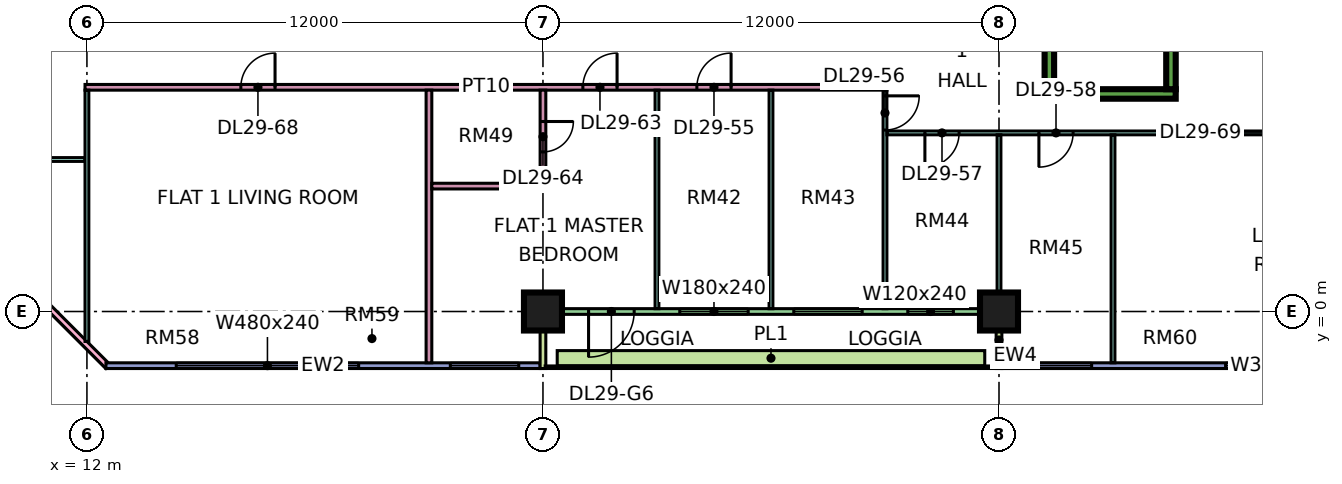
"""IFC4 building model, lengths in metres.
Left out: names, types, materials, properties, quantities, classifications, styles, units other than length and angle.
Written with IfcOpenShell. Run it as: python <this file> out.ifc"""

import sys

from ifc_helpers import new_model, si_unit, direction, frame, frame_2d, origin, origin_2d, place, context, subcontext, project, spatial, rectangle, extrude, element, fill, save


model = new_model("IFC4")
c1 = context("Model", 3, precision=1e-05, world=origin(), true_north=direction((0.0, 1.0)))
c2 = subcontext(c1, "Body", "Model", "MODEL_VIEW")
j1 = project(units=[si_unit("LENGTHUNIT", "METRE"), si_unit("PLANEANGLEUNIT", "RADIAN")], contexts=[c1])
p1 = place(None, origin())
s1 = spatial("IfcSite", under=j1, at=p1, CompositionType="ELEMENT")
p2 = place(p1, origin())
s2 = spatial("IfcBuilding", under=s1, at=p2, CompositionType="ELEMENT")
p3 = place(p2, frame((0.0, 0.0, 125.65)))
s3 = spatial("IfcBuildingStorey", under=s2, at=p3, CompositionType="ELEMENT", Elevation=125.65)
for number, where, z_axis, x_axis in (
    (1, (24.0, 0.0, 0.0), (0.0, 0.0, 1.0), (1.0, 0.0, 0.0)),
    (2, (36.0, 0.0, 0.0), (0.0, 0.0, 1.0), (1.0, 0.0, 0.0)),
):
    element("IfcColumn", number, at=place(p3, frame(where, z_axis=z_axis, x_axis=x_axis)), inside=s3, PredefinedType="COLUMN", context=c2, shape_type="SweptSolid", body=[
        extrude(rectangle(XDim=1.0, YDim=1.0, at=origin_2d()), origin(), (0.0, 0.0, 1.0), 3.75),
    ])
p4 = place(p3, frame((37.2, 5.725, 0.0), z_axis=(0.0, 0.0, 1.0), x_axis=(1.0, 0.0, 0.0)))
e3 = element("IfcWall", 3, at=p4, inside=s3, PredefinedType="SHEAR", context=c2, shape_type="SweptSolid", body=[
    extrude(rectangle(XDim=3.45, YDim=0.25, at=frame_2d((1.725, 0.0))), origin(), (0.0, 0.0, 1.0), 3.75),
])
for number, where, z_axis, x_axis in (
    (4, (37.325, 5.85, 0.0), (0.0, 0.0, 1.0), (0.0, 1.0, 0.0)),
    (5, (40.525, 5.85, 0.0), (0.0, 0.0, 1.0), (0.0, 1.0, 0.0)),
):
    element("IfcWall", number, at=place(p3, frame(where, z_axis=z_axis, x_axis=x_axis)), inside=s3, PredefinedType="SHEAR", context=c2, shape_type="SweptSolid", body=[
        extrude(rectangle(XDim=6.5, YDim=0.25, at=frame_2d((3.25, 0.0))), origin(), (0.0, 0.0, 1.0), 3.75),
    ])
p5 = place(p3, frame((-1.447, 12.553, 0.0), z_axis=(0.0, 0.0, 1.0), x_axis=(0.707106781187, -0.707106781187, 0.0)))
e6 = element("IfcWall", 6, at=p5, inside=s3, PredefinedType="SOLIDWALL", context=c2, shape_type="SweptSolid", body=[
    extrude(rectangle(XDim=19.799, YDim=0.15, at=frame_2d((9.899, 0.0))), origin(), (0.0, 0.0, 1.0), 3.35),
])
p6 = place(p5, frame((2.212, 0.0, 0.45)))
e7 = element("IfcOpeningElement", 7, at=p6, cuts=e6, PredefinedType="OPENING", context=c2, shape_type="SweptSolid", body=[
    extrude(rectangle(XDim=3.0, YDim=2.4, at=frame_2d((1.5, 1.2))), frame((0.0, 0.085, 0.0), z_axis=(0.0, -1.0, 0.0), x_axis=(1.0, 0.0, 0.0)), (0.0, 0.0, 1.0), 0.17),
])
p7 = place(p5, frame((10.216, 0.0, 0.45)))
e8 = element("IfcOpeningElement", 8, at=p7, cuts=e6, PredefinedType="OPENING", context=c2, shape_type="SweptSolid", body=[
    extrude(rectangle(XDim=3.0, YDim=2.4, at=frame_2d((1.5, 1.2))), frame((0.0, 0.085, 0.0), z_axis=(0.0, -1.0, 0.0), x_axis=(1.0, 0.0, 0.0)), (0.0, 0.0, 1.0), 0.17),
])
p8 = place(p3, frame((12.5, -1.425, 0.0), z_axis=(0.0, 0.0, 1.0), x_axis=(1.0, 0.0, 0.0)))
e9 = element("IfcWall", 9, at=p8, inside=s3, PredefinedType="SOLIDWALL", context=c2, shape_type="SweptSolid", body=[
    extrude(rectangle(XDim=11.425, YDim=0.15, at=frame_2d((5.712, 0.0))), origin(), (0.0, 0.0, 1.0), 3.35),
])
p9 = place(p8, frame((1.85, 0.0, 0.45)))
e10 = element("IfcOpeningElement", 10, at=p9, cuts=e9, PredefinedType="OPENING", context=c2, shape_type="SweptSolid", body=[
    extrude(rectangle(XDim=4.8, YDim=2.4, at=frame_2d((2.4, 1.2))), frame((0.0, 0.085, 0.0), z_axis=(0.0, -1.0, 0.0), x_axis=(1.0, 0.0, 0.0)), (0.0, 0.0, 1.0), 0.17),
])
p10 = place(p8, frame((9.062, 0.0, 0.45)))
e11 = element("IfcOpeningElement", 11, at=p10, cuts=e9, PredefinedType="OPENING", context=c2, shape_type="SweptSolid", body=[
    extrude(rectangle(XDim=1.8, YDim=2.4, at=frame_2d((0.9, 1.2))), frame((0.0, 0.085, 0.0), z_axis=(0.0, -1.0, 0.0), x_axis=(1.0, 0.0, 0.0)), (0.0, 0.0, 1.0), 0.17),
])
p11 = place(p3, frame((24.075, 0.0, 0.0), z_axis=(0.0, 0.0, 1.0), x_axis=(1.0, 0.0, 0.0)))
e12 = element("IfcWall", 12, at=p11, inside=s3, PredefinedType="SOLIDWALL", context=c2, shape_type="SweptSolid", body=[
    extrude(rectangle(XDim=11.85, YDim=0.15, at=frame_2d((5.925, 0.0))), origin(), (0.0, 0.0, 1.0), 3.35),
])
p12 = place(p11, frame((1.125, 0.0, 0.0)))
e13 = element("IfcOpeningElement", 13, at=p12, cuts=e12, PredefinedType="OPENING", context=c2, shape_type="SweptSolid", body=[
    extrude(rectangle(XDim=1.2, YDim=2.4, at=frame_2d((0.6, 1.2))), frame((0.0, 0.085, 0.0), z_axis=(0.0, -1.0, 0.0), x_axis=(1.0, 0.0, 0.0)), (0.0, 0.0, 1.0), 0.17),
])
p13 = place(p11, frame((3.525, 0.0, 0.45)))
e14 = element("IfcOpeningElement", 14, at=p13, cuts=e12, PredefinedType="OPENING", context=c2, shape_type="SweptSolid", body=[
    extrude(rectangle(XDim=1.8, YDim=2.4, at=frame_2d((0.9, 1.2))), frame((0.0, 0.085, 0.0), z_axis=(0.0, -1.0, 0.0), x_axis=(1.0, 0.0, 0.0)), (0.0, 0.0, 1.0), 0.17),
])
p14 = place(p11, frame((6.525, 0.0, 0.45)))
e15 = element("IfcOpeningElement", 15, at=p14, cuts=e12, PredefinedType="OPENING", context=c2, shape_type="SweptSolid", body=[
    extrude(rectangle(XDim=1.8, YDim=2.4, at=frame_2d((0.9, 1.2))), frame((0.0, 0.085, 0.0), z_axis=(0.0, -1.0, 0.0), x_axis=(1.0, 0.0, 0.0)), (0.0, 0.0, 1.0), 0.17),
])
p15 = place(p11, frame((9.525, 0.0, 0.45)))
e16 = element("IfcOpeningElement", 16, at=p15, cuts=e12, PredefinedType="OPENING", context=c2, shape_type="SweptSolid", body=[
    extrude(rectangle(XDim=1.2, YDim=2.4, at=frame_2d((0.6, 1.2))), frame((0.0, 0.085, 0.0), z_axis=(0.0, -1.0, 0.0), x_axis=(1.0, 0.0, 0.0)), (0.0, 0.0, 1.0), 0.17),
])
for number, where, z_axis, x_axis in (
    (17, (24.0, -1.5, 0.0), (0.0, 0.0, 1.0), (0.0, 1.0, 0.0)),
    (18, (36.0, -1.5, 0.0), (0.0, 0.0, 1.0), (0.0, 1.0, 0.0)),
):
    element("IfcWall", number, at=place(p3, frame(where, z_axis=z_axis, x_axis=x_axis)), inside=s3, PredefinedType="SOLIDWALL", context=c2, shape_type="SweptSolid", body=[
        extrude(rectangle(XDim=1.5, YDim=0.15, at=frame_2d((0.75, 0.0))), origin(), (0.0, 0.0, 1.0), 3.35),
    ])
p16 = place(p3, frame((36.075, -1.425, 0.0), z_axis=(0.0, 0.0, 1.0), x_axis=(1.0, 0.0, 0.0)))
e19 = element("IfcWall", 19, at=p16, inside=s3, PredefinedType="SOLIDWALL", context=c2, shape_type="SweptSolid", body=[
    extrude(rectangle(XDim=11.85, YDim=0.15, at=frame_2d((5.925, 0.0))), origin(), (0.0, 0.0, 1.0), 3.35),
])
p17 = place(p16, frame((0.562, 0.0, 0.45)))
e20 = element("IfcOpeningElement", 20, at=p17, cuts=e19, PredefinedType="OPENING", context=c2, shape_type="SweptSolid", body=[
    extrude(rectangle(XDim=1.8, YDim=2.4, at=frame_2d((0.9, 1.2))), frame((0.0, 0.085, 0.0), z_axis=(0.0, -1.0, 0.0), x_axis=(1.0, 0.0, 0.0)), (0.0, 0.0, 1.0), 0.17),
])
p18 = place(p16, frame((5.887, 0.0, 0.45)))
e21 = element("IfcOpeningElement", 21, at=p18, cuts=e19, PredefinedType="OPENING", context=c2, shape_type="SweptSolid", body=[
    extrude(rectangle(XDim=3.0, YDim=2.4, at=frame_2d((1.5, 1.2))), frame((0.0, 0.085, 0.0), z_axis=(0.0, -1.0, 0.0), x_axis=(1.0, 0.0, 0.0)), (0.0, 0.0, 1.0), 0.17),
])
p19 = place(p3, frame((24.375, -1.229, 0.0), z_axis=(0.0, 0.0, 1.0), x_axis=(1.0, 0.0, 0.0)))
e22 = element("IfcWall", 22, at=p19, inside=s3, PredefinedType="SOLIDWALL", context=c2, shape_type="SweptSolid", body=[
    extrude(rectangle(XDim=11.25, YDim=0.4, at=frame_2d((5.625, 0.0))), origin(), (0.0, 0.0, 1.0), 0.7),
])
p20 = place(p3, frame((9.05, 4.0, 0.0), z_axis=(0.0, 0.0, 1.0), x_axis=(1.0, 0.0, 0.0)))
e23 = element("IfcWall", 23, at=p20, inside=s3, PredefinedType="PARTITIONING", context=c2, shape_type="SweptSolid", body=[
    extrude(rectangle(XDim=2.9, YDim=0.1, at=frame_2d((1.45, 0.0))), origin(), (0.0, 0.0, 1.0), 3.35),
])
p21 = place(p3, frame((11.95, 5.9, 0.0), z_axis=(0.0, 0.0, 1.0), x_axis=(1.0, 0.0, 0.0)))
e24 = element("IfcWall", 24, at=p21, inside=s3, PredefinedType="PARTITIONING", context=c2, shape_type="SweptSolid", body=[
    extrude(rectangle(XDim=21.1, YDim=0.15, at=frame_2d((10.55, 0.0))), origin(), (0.0, 0.0, 1.0), 3.35),
])
p22 = place(p21, frame((16.1, 0.0, 0.0)))
e25 = element("IfcOpeningElement", 25, at=p22, cuts=e24, PredefinedType="OPENING", context=c2, shape_type="SweptSolid", body=[
    extrude(rectangle(XDim=0.9, YDim=2.1, at=frame_2d((0.45, 1.05))), frame((0.0, 0.085, 0.0), z_axis=(0.0, -1.0, 0.0), x_axis=(1.0, 0.0, 0.0)), (0.0, 0.0, 1.0), 0.17),
])
p23 = place(p21, frame((13.1, 0.0, 0.0)))
e26 = element("IfcOpeningElement", 26, at=p23, cuts=e24, PredefinedType="OPENING", context=c2, shape_type="SweptSolid", body=[
    extrude(rectangle(XDim=0.9, YDim=2.1, at=frame_2d((0.45, 1.05))), frame((0.0, 0.085, 0.0), z_axis=(0.0, -1.0, 0.0), x_axis=(1.0, 0.0, 0.0)), (0.0, 0.0, 1.0), 0.17),
])
p24 = place(p21, frame((4.1, 0.0, 0.0)))
e27 = element("IfcOpeningElement", 27, at=p24, cuts=e24, PredefinedType="OPENING", context=c2, shape_type="SweptSolid", body=[
    extrude(rectangle(XDim=0.9, YDim=2.1, at=frame_2d((0.45, 1.05))), frame((0.0, 0.085, 0.0), z_axis=(0.0, -1.0, 0.0), x_axis=(1.0, 0.0, 0.0)), (0.0, 0.0, 1.0), 0.17),
])
p25 = place(p3, frame((12.0, -0.788, 0.0), z_axis=(0.0, 0.0, 1.0), x_axis=(0.0, 1.0, 0.0)))
e28 = element("IfcWall", 28, at=p25, inside=s3, PredefinedType="PARTITIONING", context=c2, shape_type="SweptSolid", body=[
    extrude(rectangle(XDim=6.613, YDim=0.1, at=frame_2d((3.306, 0.0))), origin(), (0.0, 0.0, 1.0), 3.35),
])
p26 = place(p3, frame((21.0, -1.35, 0.0), z_axis=(0.0, 0.0, 1.0), x_axis=(0.0, 1.0, 0.0)))
e29 = element("IfcWall", 29, at=p26, inside=s3, PredefinedType="PARTITIONING", context=c2, shape_type="SweptSolid", body=[
    extrude(rectangle(XDim=7.175, YDim=0.15, at=frame_2d((3.587, 0.0))), origin(), (0.0, 0.0, 1.0), 3.35),
])
p27 = place(p3, frame((21.075, 3.3, 0.0), z_axis=(0.0, 0.0, 1.0), x_axis=(1.0, 0.0, 0.0)))
e30 = element("IfcWall", 30, at=p27, inside=s3, PredefinedType="PARTITIONING", context=c2, shape_type="SweptSolid", body=[
    extrude(rectangle(XDim=3.0, YDim=0.15, at=frame_2d((1.5, 0.0))), origin(), (0.0, 0.0, 1.0), 3.35),
])
p28 = place(p3, frame((24.0, 3.375, 0.0), z_axis=(0.0, 0.0, 1.0), x_axis=(0.0, 1.0, 0.0)))
e31 = element("IfcWall", 31, at=p28, inside=s3, PredefinedType="PARTITIONING", context=c2, shape_type="SweptSolid", body=[
    extrude(rectangle(XDim=2.45, YDim=0.15, at=frame_2d((1.225, 0.0))), origin(), (0.0, 0.0, 1.0), 3.35),
])
p29 = place(p28, frame((0.825, 0.0, 0.0)))
e32 = element("IfcOpeningElement", 32, at=p29, cuts=e31, PredefinedType="OPENING", context=c2, shape_type="SweptSolid", body=[
    extrude(rectangle(XDim=0.8, YDim=2.1, at=frame_2d((0.4, 1.05))), frame((0.0, 0.085, 0.0), z_axis=(0.0, -1.0, 0.0), x_axis=(1.0, 0.0, 0.0)), (0.0, 0.0, 1.0), 0.17),
])
for number, where, z_axis, x_axis in (
    (33, (27.0, 0.074, 0.0), (0.0, 0.0, 1.0), (0.0, 1.0, 0.0)),
    (34, (30.0, 0.074, 0.0), (0.0, 0.0, 1.0), (0.0, 1.0, 0.0)),
):
    element("IfcWall", number, at=place(p3, frame(where, z_axis=z_axis, x_axis=x_axis)), inside=s3, PredefinedType="PARTITIONING", context=c2, shape_type="SweptSolid", body=[
        extrude(rectangle(XDim=5.751, YDim=0.1, at=frame_2d((2.875, 0.0))), origin(), (0.0, 0.0, 1.0), 3.35),
    ])
p30 = place(p3, frame((33.0, 0.074, 0.0), z_axis=(0.0, 0.0, 1.0), x_axis=(0.0, 1.0, 0.0)))
e35 = element("IfcWall", 35, at=p30, inside=s3, PredefinedType="PARTITIONING", context=c2, shape_type="SweptSolid", body=[
    extrude(rectangle(XDim=5.751, YDim=0.1, at=frame_2d((2.875, 0.0))), origin(), (0.0, 0.0, 1.0), 3.35),
])
p31 = place(p30, frame((4.701, 0.0, 0.0)))
e36 = element("IfcOpeningElement", 36, at=p31, cuts=e35, PredefinedType="OPENING", context=c2, shape_type="SweptSolid", body=[
    extrude(rectangle(XDim=0.9, YDim=2.1, at=frame_2d((0.45, 1.05))), frame((0.0, 0.06, 0.0), z_axis=(0.0, -1.0, 0.0), x_axis=(1.0, 0.0, 0.0)), (0.0, 0.0, 1.0), 0.12),
])
p32 = place(p3, frame((33.05, 4.7, 0.0), z_axis=(0.0, 0.0, 1.0), x_axis=(1.0, 0.0, 0.0)))
e37 = element("IfcWall", 37, at=p32, inside=s3, PredefinedType="PARTITIONING", context=c2, shape_type="SweptSolid", body=[
    extrude(rectangle(XDim=20.85, YDim=0.1, at=frame_2d((10.425, 0.0))), origin(), (0.0, 0.0, 1.0), 3.35),
])
p33 = place(p32, frame((1.0, 0.0, 0.0)))
e38 = element("IfcOpeningElement", 38, at=p33, cuts=e37, PredefinedType="OPENING", context=c2, shape_type="SweptSolid", body=[
    extrude(rectangle(XDim=0.9, YDim=2.1, at=frame_2d((0.45, 1.05))), frame((0.0, 0.06, 0.0), z_axis=(0.0, -1.0, 0.0), x_axis=(1.0, 0.0, 0.0)), (0.0, 0.0, 1.0), 0.12),
])
p34 = place(p32, frame((4.0, 0.0, 0.0)))
e39 = element("IfcOpeningElement", 39, at=p34, cuts=e37, PredefinedType="OPENING", context=c2, shape_type="SweptSolid", body=[
    extrude(rectangle(XDim=0.9, YDim=2.1, at=frame_2d((0.45, 1.05))), frame((0.0, 0.06, 0.0), z_axis=(0.0, -1.0, 0.0), x_axis=(1.0, 0.0, 0.0)), (0.0, 0.0, 1.0), 0.12),
])
p35 = place(p32, frame((16.0, 0.0, 0.0)))
e40 = element("IfcOpeningElement", 40, at=p35, cuts=e37, PredefinedType="OPENING", context=c2, shape_type="SweptSolid", body=[
    extrude(rectangle(XDim=0.9, YDim=2.1, at=frame_2d((0.45, 1.05))), frame((0.0, 0.06, 0.0), z_axis=(0.0, -1.0, 0.0), x_axis=(1.0, 0.0, 0.0)), (0.0, 0.0, 1.0), 0.12),
])
p36 = place(p32, frame((19.0, 0.0, 0.0)))
e41 = element("IfcOpeningElement", 41, at=p36, cuts=e37, PredefinedType="OPENING", context=c2, shape_type="SweptSolid", body=[
    extrude(rectangle(XDim=0.9, YDim=2.1, at=frame_2d((0.45, 1.05))), frame((0.0, 0.06, 0.0), z_axis=(0.0, -1.0, 0.0), x_axis=(1.0, 0.0, 0.0)), (0.0, 0.0, 1.0), 0.12),
])
p37 = place(p32, frame((10.0, 0.0, 0.0)))
e42 = element("IfcOpeningElement", 42, at=p37, cuts=e37, PredefinedType="OPENING", context=c2, shape_type="SweptSolid", body=[
    extrude(rectangle(XDim=0.9, YDim=2.1, at=frame_2d((0.45, 1.05))), frame((0.0, 0.06, 0.0), z_axis=(0.0, -1.0, 0.0), x_axis=(1.0, 0.0, 0.0)), (0.0, 0.0, 1.0), 0.12),
])
p38 = place(p3, frame((36.0, 0.0, 0.0), z_axis=(0.0, 0.0, 1.0), x_axis=(0.0, 1.0, 0.0)))
e43 = element("IfcWall", 43, at=p38, inside=s3, PredefinedType="PARTITIONING", context=c2, shape_type="SweptSolid", body=[
    extrude(rectangle(XDim=4.65, YDim=0.1, at=frame_2d((2.325, 0.0))), origin(), (0.0, 0.0, 1.0), 3.35),
])
p39 = place(p3, frame((39.0, -1.35, 0.0), z_axis=(0.0, 0.0, 1.0), x_axis=(0.0, 1.0, 0.0)))
e44 = element("IfcWall", 44, at=p39, inside=s3, PredefinedType="PARTITIONING", context=c2, shape_type="SweptSolid", body=[
    extrude(rectangle(XDim=6.0, YDim=0.1, at=frame_2d((3.0, 0.0))), origin(), (0.0, 0.0, 1.0), 3.35),
])
p40 = place(p9, origin())
e45 = element("IfcWindow", 45, at=p40, inside=s3, PartitioningType="SINGLE_PANEL", PredefinedType="WINDOW", context=c2, shape_type="SweptSolid", body=[
    extrude(rectangle(XDim=4.8, YDim=2.4, at=frame_2d((2.4, 1.2))), frame((0.0, 0.03, 0.0), z_axis=(0.0, -1.0, 0.0), x_axis=(1.0, 0.0, 0.0)), (0.0, 0.0, 1.0), 0.06),
])
fill(e10, e45)
p41 = place(p10, origin())
e46 = element("IfcWindow", 46, at=p41, inside=s3, PartitioningType="SINGLE_PANEL", PredefinedType="WINDOW", context=c2, shape_type="SweptSolid", body=[
    extrude(rectangle(XDim=1.8, YDim=2.4, at=frame_2d((0.9, 1.2))), frame((0.0, 0.03, 0.0), z_axis=(0.0, -1.0, 0.0), x_axis=(1.0, 0.0, 0.0)), (0.0, 0.0, 1.0), 0.06),
])
fill(e11, e46)
p42 = place(p12, frame((1.2, 0.0, 0.0), z_axis=(0.0, 0.0, 1.0), x_axis=(-1.0, 0.0, 0.0)))
e47 = element("IfcDoor", 47, at=p42, inside=s3, OperationType="DOUBLE_DOOR_SINGLE_SWING", PredefinedType="DOOR", context=c2, shape_type="SweptSolid", body=[
    extrude(rectangle(XDim=1.2, YDim=2.4, at=frame_2d((0.6, 1.2))), frame((0.0, 0.025, 0.0), z_axis=(0.0, -1.0, 0.0), x_axis=(1.0, 0.0, 0.0)), (0.0, 0.0, 1.0), 0.05),
])
fill(e13, e47)
p43 = place(p13, origin())
e48 = element("IfcWindow", 48, at=p43, inside=s3, PartitioningType="SINGLE_PANEL", PredefinedType="WINDOW", context=c2, shape_type="SweptSolid", body=[
    extrude(rectangle(XDim=1.8, YDim=2.4, at=frame_2d((0.9, 1.2))), frame((0.0, 0.03, 0.0), z_axis=(0.0, -1.0, 0.0), x_axis=(1.0, 0.0, 0.0)), (0.0, 0.0, 1.0), 0.06),
])
fill(e14, e48)
p44 = place(p14, origin())
e49 = element("IfcWindow", 49, at=p44, inside=s3, PartitioningType="SINGLE_PANEL", PredefinedType="WINDOW", context=c2, shape_type="SweptSolid", body=[
    extrude(rectangle(XDim=1.8, YDim=2.4, at=frame_2d((0.9, 1.2))), frame((0.0, 0.03, 0.0), z_axis=(0.0, -1.0, 0.0), x_axis=(1.0, 0.0, 0.0)), (0.0, 0.0, 1.0), 0.06),
])
fill(e15, e49)
p45 = place(p15, origin())
e50 = element("IfcWindow", 50, at=p45, inside=s3, PartitioningType="SINGLE_PANEL", PredefinedType="WINDOW", context=c2, shape_type="SweptSolid", body=[
    extrude(rectangle(XDim=1.2, YDim=2.4, at=frame_2d((0.6, 1.2))), frame((0.0, 0.03, 0.0), z_axis=(0.0, -1.0, 0.0), x_axis=(1.0, 0.0, 0.0)), (0.0, 0.0, 1.0), 0.06),
])
fill(e16, e50)
p46 = place(p17, origin())
e51 = element("IfcWindow", 51, at=p46, inside=s3, PartitioningType="SINGLE_PANEL", PredefinedType="WINDOW", context=c2, shape_type="SweptSolid", body=[
    extrude(rectangle(XDim=1.8, YDim=2.4, at=frame_2d((0.9, 1.2))), frame((0.0, 0.03, 0.0), z_axis=(0.0, -1.0, 0.0), x_axis=(1.0, 0.0, 0.0)), (0.0, 0.0, 1.0), 0.06),
])
fill(e20, e51)
p47 = place(p18, origin())
e52 = element("IfcWindow", 52, at=p47, inside=s3, PartitioningType="SINGLE_PANEL", PredefinedType="WINDOW", context=c2, shape_type="SweptSolid", body=[
    extrude(rectangle(XDim=3.0, YDim=2.4, at=frame_2d((1.5, 1.2))), frame((0.0, 0.03, 0.0), z_axis=(0.0, -1.0, 0.0), x_axis=(1.0, 0.0, 0.0)), (0.0, 0.0, 1.0), 0.06),
])
fill(e21, e52)
p48 = place(p22, frame((0.9, 0.0, 0.0), z_axis=(0.0, 0.0, 1.0), x_axis=(-1.0, 0.0, 0.0)))
e53 = element("IfcDoor", 53, at=p48, inside=s3, OperationType="SINGLE_SWING_RIGHT", PredefinedType="DOOR", context=c2, shape_type="SweptSolid", body=[
    extrude(rectangle(XDim=0.9, YDim=2.1, at=frame_2d((0.45, 1.05))), frame((0.0, 0.025, 0.0), z_axis=(0.0, -1.0, 0.0), x_axis=(1.0, 0.0, 0.0)), (0.0, 0.0, 1.0), 0.05),
])
fill(e25, e53)
p49 = place(p31, origin())
e54 = element("IfcDoor", 54, at=p49, inside=s3, OperationType="SINGLE_SWING_RIGHT", PredefinedType="DOOR", context=c2, shape_type="SweptSolid", body=[
    extrude(rectangle(XDim=0.9, YDim=2.1, at=frame_2d((0.45, 1.05))), frame((0.0, 0.025, 0.0), z_axis=(0.0, -1.0, 0.0), x_axis=(1.0, 0.0, 0.0)), (0.0, 0.0, 1.0), 0.05),
])
fill(e36, e54)
p50 = place(p33, frame((0.9, 0.0, 0.0), z_axis=(0.0, 0.0, 1.0), x_axis=(-1.0, 0.0, 0.0)))
e55 = element("IfcDoor", 55, at=p50, inside=s3, OperationType="SINGLE_SWING_LEFT", PredefinedType="DOOR", context=c2, shape_type="SweptSolid", body=[
    extrude(rectangle(XDim=0.9, YDim=2.1, at=frame_2d((0.45, 1.05))), frame((0.0, 0.025, 0.0), z_axis=(0.0, -1.0, 0.0), x_axis=(1.0, 0.0, 0.0)), (0.0, 0.0, 1.0), 0.05),
])
fill(e38, e55)
p51 = place(p34, frame((0.9, 0.0, 0.0), z_axis=(0.0, 0.0, 1.0), x_axis=(-1.0, 0.0, 0.0)))
e56 = element("IfcDoor", 56, at=p51, inside=s3, OperationType="SINGLE_SWING_LEFT", PredefinedType="DOOR", context=c2, shape_type="SweptSolid", body=[
    extrude(rectangle(XDim=0.9, YDim=2.1, at=frame_2d((0.45, 1.05))), frame((0.0, 0.025, 0.0), z_axis=(0.0, -1.0, 0.0), x_axis=(1.0, 0.0, 0.0)), (0.0, 0.0, 1.0), 0.05),
])
fill(e39, e56)
p52 = place(p23, frame((0.9, 0.0, 0.0), z_axis=(0.0, 0.0, 1.0), x_axis=(-1.0, 0.0, 0.0)))
e57 = element("IfcDoor", 57, at=p52, inside=s3, OperationType="SINGLE_SWING_RIGHT", PredefinedType="DOOR", context=c2, shape_type="SweptSolid", body=[
    extrude(rectangle(XDim=0.9, YDim=2.1, at=frame_2d((0.45, 1.05))), frame((0.0, 0.025, 0.0), z_axis=(0.0, -1.0, 0.0), x_axis=(1.0, 0.0, 0.0)), (0.0, 0.0, 1.0), 0.05),
])
fill(e26, e57)
p53 = place(p29, origin())
e58 = element("IfcDoor", 58, at=p53, inside=s3, OperationType="SINGLE_SWING_RIGHT", PredefinedType="DOOR", context=c2, shape_type="SweptSolid", body=[
    extrude(rectangle(XDim=0.8, YDim=2.1, at=frame_2d((0.4, 1.05))), frame((0.0, 0.025, 0.0), z_axis=(0.0, -1.0, 0.0), x_axis=(1.0, 0.0, 0.0)), (0.0, 0.0, 1.0), 0.05),
])
fill(e32, e58)
p54 = place(p24, frame((0.9, 0.0, 0.0), z_axis=(0.0, 0.0, 1.0), x_axis=(-1.0, 0.0, 0.0)))
e59 = element("IfcDoor", 59, at=p54, inside=s3, OperationType="SINGLE_SWING_RIGHT", PredefinedType="DOOR", context=c2, shape_type="SweptSolid", body=[
    extrude(rectangle(XDim=0.9, YDim=2.1, at=frame_2d((0.45, 1.05))), frame((0.0, 0.025, 0.0), z_axis=(0.0, -1.0, 0.0), x_axis=(1.0, 0.0, 0.0)), (0.0, 0.0, 1.0), 0.05),
])
fill(e27, e59)
save(model, sys.argv[1])
